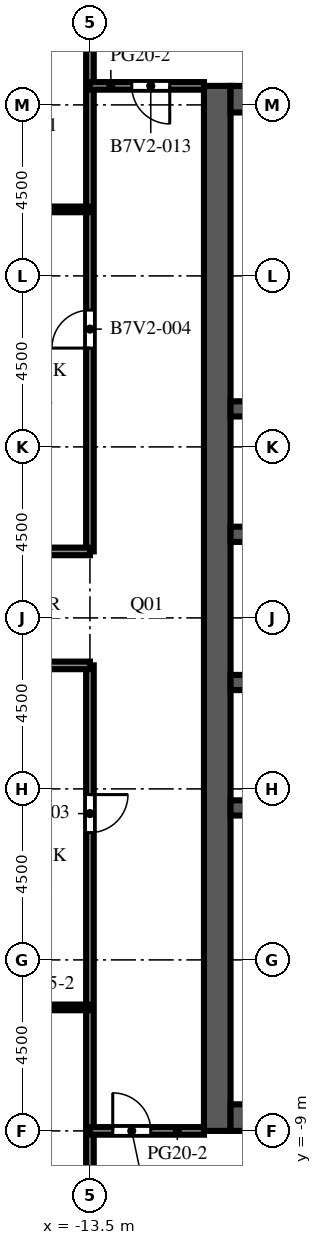
"""IFC4 building model, lengths in metres.
Left out: names, types, materials, properties, quantities, classifications, styles, units other than length and angle.
Written with IfcOpenShell. Run it as: python <this file> out.ifc"""

import sys

from ifc_helpers import new_model, si_unit, direction, frame, frame_2d, origin, place, context, subcontext, project, spatial, rectangle, extrude, element, fill, save


model = new_model("IFC4")
c1 = context("Model", 3, precision=1e-05, world=origin(), true_north=direction((0.0, 1.0)))
c2 = subcontext(c1, "Body", "Model", "MODEL_VIEW")
j1 = project(units=[si_unit("LENGTHUNIT", "METRE"), si_unit("PLANEANGLEUNIT", "RADIAN")], contexts=[c1])
p1 = place(None, origin())
s1 = spatial("IfcSite", under=j1, at=p1, CompositionType="ELEMENT")
p2 = place(p1, origin())
s2 = spatial("IfcBuilding", under=s1, at=p2, CompositionType="ELEMENT")
p3 = place(p2, frame((0.0, 0.0, 256.2)))
s3 = spatial("IfcBuildingStorey", under=s2, at=p3, CompositionType="ELEMENT", Elevation=256.2)
p4 = place(p3, frame((-10.15, -9.0, 0.0), z_axis=(0.0, 0.0, 1.0), x_axis=(0.0, 1.0, 0.0)))
e1 = element("IfcWall", 1, at=p4, inside=s3, PredefinedType="SHEAR", context=c2, shape_type="SweptSolid", body=[
    extrude(rectangle(XDim=27.5, YDim=0.7, at=frame_2d((13.75, 0.0))), origin(), (0.0, 0.0, 1.0), 4.1),
])
p5 = place(p4, frame((12.55, 0.0, 0.0)))
e2 = element("IfcOpeningElement", 2, at=p5, cuts=e1, PredefinedType="OPENING", context=c2, shape_type="SweptSolid", body=[
    extrude(rectangle(XDim=2.4, YDim=2.4, at=frame_2d((1.2, 1.2))), frame((0.0, 0.36, 0.0), z_axis=(0.0, -1.0, 0.0), x_axis=(1.0, 0.0, 0.0)), (0.0, 0.0, 1.0), 0.72),
])
p6 = place(p4, frame((6.825, 0.0, 0.0)))
e3 = element("IfcOpeningElement", 3, at=p6, cuts=e1, PredefinedType="OPENING", context=c2, shape_type="SweptSolid", body=[
    extrude(rectangle(XDim=1.2, YDim=2.1, at=frame_2d((0.6, 1.05))), frame((0.0, 0.36, 0.0), z_axis=(0.0, -1.0, 0.0), x_axis=(1.0, 0.0, 0.0)), (0.0, 0.0, 1.0), 0.72),
])
p7 = place(p4, frame((19.475, 0.0, 0.0)))
e4 = element("IfcOpeningElement", 4, at=p7, cuts=e1, PredefinedType="OPENING", context=c2, shape_type="SweptSolid", body=[
    extrude(rectangle(XDim=1.2, YDim=2.1, at=frame_2d((0.6, 1.05))), frame((0.0, 0.36, 0.0), z_axis=(0.0, -1.0, 0.0), x_axis=(1.0, 0.0, 0.0)), (0.0, 0.0, 1.0), 0.72),
])
for number, where, z_axis, x_axis in (
    (5, (-9.8, -8.65, 0.0), (0.0, 0.0, 1.0), (1.0, 0.0, 0.0)),
    (6, (-9.8, 18.15, 0.0), (0.0, 0.0, 1.0), (1.0, 0.0, 0.0)),
):
    element("IfcWall", number, at=place(p3, frame(where, z_axis=z_axis, x_axis=x_axis)), inside=s3, PredefinedType="SHEAR", context=c2, shape_type="SweptSolid", body=[
        extrude(rectangle(XDim=10.6, YDim=0.7, at=frame_2d((5.3, 0.0))), origin(), (0.0, 0.0, 1.0), 4.1),
    ])
p8 = place(p3, frame((-9.8, -0.5, 0.0), z_axis=(0.0, 0.0, 1.0), x_axis=(1.0, 0.0, 0.0)))
e7 = element("IfcWall", 7, at=p8, inside=s3, PredefinedType="SHEAR", context=c2, shape_type="SweptSolid", body=[
    extrude(rectangle(XDim=10.6, YDim=0.4, at=frame_2d((5.3, 0.0))), origin(), (0.0, 0.0, 1.0), 4.1),
])
p9 = place(p3, frame((-9.8, 2.8, 0.0), z_axis=(0.0, 0.0, 1.0), x_axis=(1.0, 0.0, 0.0)))
e8 = element("IfcWall", 8, at=p9, inside=s3, PredefinedType="SHEAR", context=c2, shape_type="SweptSolid", body=[
    extrude(rectangle(XDim=10.6, YDim=0.4, at=frame_2d((5.3, 0.0))), origin(), (0.0, 0.0, 1.0), 4.1),
])
p10 = place(p9, frame((0.688, 0.0, 0.0)))
e9 = element("IfcOpeningElement", 9, at=p10, cuts=e8, PredefinedType="OPENING", context=c2, shape_type="SweptSolid", body=[
    extrude(rectangle(XDim=1.1, YDim=2.1, at=frame_2d((0.55, 1.05))), frame((0.0, 0.21, 0.0), z_axis=(0.0, -1.0, 0.0), x_axis=(1.0, 0.0, 0.0)), (0.0, 0.0, 1.0), 0.42),
])
p11 = place(p9, frame((3.438, 0.0, 0.0)))
e10 = element("IfcOpeningElement", 10, at=p11, cuts=e8, PredefinedType="OPENING", context=c2, shape_type="SweptSolid", body=[
    extrude(rectangle(XDim=1.1, YDim=2.1, at=frame_2d((0.55, 1.05))), frame((0.0, 0.21, 0.0), z_axis=(0.0, -1.0, 0.0), x_axis=(1.0, 0.0, 0.0)), (0.0, 0.0, 1.0), 0.42),
])
p12 = place(p9, frame((6.113, 0.0, 0.0)))
e11 = element("IfcOpeningElement", 11, at=p12, cuts=e8, PredefinedType="OPENING", context=c2, shape_type="SweptSolid", body=[
    extrude(rectangle(XDim=1.0, YDim=2.1, at=frame_2d((0.5, 1.05))), frame((0.0, 0.21, 0.0), z_axis=(0.0, -1.0, 0.0), x_axis=(1.0, 0.0, 0.0)), (0.0, 0.0, 1.0), 0.42),
])
p13 = place(p9, frame((8.863, 0.0, 0.0)))
e12 = element("IfcOpeningElement", 12, at=p13, cuts=e8, PredefinedType="OPENING", context=c2, shape_type="SweptSolid", body=[
    extrude(rectangle(XDim=1.0, YDim=2.1, at=frame_2d((0.5, 1.05))), frame((0.0, 0.21, 0.0), z_axis=(0.0, -1.0, 0.0), x_axis=(1.0, 0.0, 0.0)), (0.0, 0.0, 1.0), 0.42),
])
p14 = place(p3, frame((-9.8, 6.7, 0.0), z_axis=(0.0, 0.0, 1.0), x_axis=(1.0, 0.0, 0.0)))
e13 = element("IfcWall", 13, at=p14, inside=s3, PredefinedType="SHEAR", context=c2, shape_type="SweptSolid", body=[
    extrude(rectangle(XDim=10.6, YDim=0.4, at=frame_2d((5.3, 0.0))), origin(), (0.0, 0.0, 1.0), 4.1),
])
p15 = place(p14, frame((3.438, 0.0, 0.0)))
e14 = element("IfcOpeningElement", 14, at=p15, cuts=e13, PredefinedType="OPENING", context=c2, shape_type="SweptSolid", body=[
    extrude(rectangle(XDim=1.1, YDim=2.1, at=frame_2d((0.55, 1.05))), frame((0.0, 0.21, 0.0), z_axis=(0.0, -1.0, 0.0), x_axis=(1.0, 0.0, 0.0)), (0.0, 0.0, 1.0), 0.42),
])
p16 = place(p14, frame((6.062, 0.0, 0.0)))
e15 = element("IfcOpeningElement", 15, at=p16, cuts=e13, PredefinedType="OPENING", context=c2, shape_type="SweptSolid", body=[
    extrude(rectangle(XDim=1.1, YDim=2.1, at=frame_2d((0.55, 1.05))), frame((0.0, 0.21, 0.0), z_axis=(0.0, -1.0, 0.0), x_axis=(1.0, 0.0, 0.0)), (0.0, 0.0, 1.0), 0.42),
])
p17 = place(p14, frame((8.812, 0.0, 0.0)))
e16 = element("IfcOpeningElement", 16, at=p17, cuts=e13, PredefinedType="OPENING", context=c2, shape_type="SweptSolid", body=[
    extrude(rectangle(XDim=1.1, YDim=2.1, at=frame_2d((0.55, 1.05))), frame((0.0, 0.21, 0.0), z_axis=(0.0, -1.0, 0.0), x_axis=(1.0, 0.0, 0.0)), (0.0, 0.0, 1.0), 0.42),
])
p18 = place(p14, frame((0.738, 0.0, 0.0)))
e17 = element("IfcOpeningElement", 17, at=p18, cuts=e13, PredefinedType="OPENING", context=c2, shape_type="SweptSolid", body=[
    extrude(rectangle(XDim=1.0, YDim=2.1, at=frame_2d((0.5, 1.05))), frame((0.0, 0.21, 0.0), z_axis=(0.0, -1.0, 0.0), x_axis=(1.0, 0.0, 0.0)), (0.0, 0.0, 1.0), 0.42),
])
p19 = place(p3, frame((-9.8, 10.0, 0.0), z_axis=(0.0, 0.0, 1.0), x_axis=(1.0, 0.0, 0.0)))
e18 = element("IfcWall", 18, at=p19, inside=s3, PredefinedType="SHEAR", context=c2, shape_type="SweptSolid", body=[
    extrude(rectangle(XDim=10.6, YDim=0.4, at=frame_2d((5.3, 0.0))), origin(), (0.0, 0.0, 1.0), 4.1),
])
p20 = place(p3, frame((-13.5, -22.077, 0.0), z_axis=(0.0, 0.0, 1.0), x_axis=(0.0, 1.0, 0.0)))
e19 = element("IfcWall", 19, at=p20, inside=s3, PredefinedType="PARTITIONING", context=c2, shape_type="SweptSolid", body=[
    extrude(rectangle(XDim=25.327, YDim=0.2, at=frame_2d((12.664, 0.0))), origin(), (0.0, 0.0, 1.0), 3.5),
])
p21 = place(p20, frame((20.927, 0.0, 0.0)))
e20 = element("IfcOpeningElement", 20, at=p21, cuts=e19, PredefinedType="OPENING", context=c2, shape_type="SweptSolid", body=[
    extrude(rectangle(XDim=1.0, YDim=2.1, at=frame_2d((0.5, 1.05))), frame((0.0, 0.11, 0.0), z_axis=(0.0, -1.0, 0.0), x_axis=(1.0, 0.0, 0.0)), (0.0, 0.0, 1.0), 0.22),
])
p22 = place(p3, frame((-13.5, 6.25, 0.0), z_axis=(0.0, 0.0, 1.0), x_axis=(0.0, 1.0, 0.0)))
e21 = element("IfcWall", 21, at=p22, inside=s3, PredefinedType="PARTITIONING", context=c2, shape_type="SweptSolid", body=[
    extrude(rectangle(XDim=24.827, YDim=0.2, at=frame_2d((12.414, 0.0))), origin(), (0.0, 0.0, 1.0), 3.5),
])
p23 = place(p22, frame((5.35, 0.0, 0.0)))
e22 = element("IfcOpeningElement", 22, at=p23, cuts=e21, PredefinedType="OPENING", context=c2, shape_type="SweptSolid", body=[
    extrude(rectangle(XDim=1.0, YDim=2.1, at=frame_2d((0.5, 1.05))), frame((0.0, 0.11, 0.0), z_axis=(0.0, -1.0, 0.0), x_axis=(1.0, 0.0, 0.0)), (0.0, 0.0, 1.0), 0.22),
])
p24 = place(p3, frame((-10.5, -9.0, 0.0), z_axis=(0.0, 0.0, 1.0), x_axis=(-1.0, 0.0, 0.0)))
e23 = element("IfcWall", 23, at=p24, inside=s3, PredefinedType="PARTITIONING", context=c2, shape_type="SweptSolid", body=[
    extrude(rectangle(XDim=3.0, YDim=0.2, at=frame_2d((1.5, 0.0))), origin(), (0.0, 0.0, 1.0), 3.5),
])
p25 = place(p24, frame((1.4, 0.0, 0.0)))
e24 = element("IfcOpeningElement", 24, at=p25, cuts=e23, PredefinedType="OPENING", context=c2, shape_type="SweptSolid", body=[
    extrude(rectangle(XDim=1.0, YDim=2.1, at=frame_2d((0.5, 1.05))), frame((0.0, 0.11, 0.0), z_axis=(0.0, -1.0, 0.0), x_axis=(1.0, 0.0, 0.0)), (0.0, 0.0, 1.0), 0.22),
])
p26 = place(p3, frame((-13.5, -5.75, 0.0), z_axis=(0.0, 0.0, 1.0), x_axis=(-1.0, 0.0, 0.0)))
e25 = element("IfcWall", 25, at=p26, inside=s3, PredefinedType="PARTITIONING", context=c2, shape_type="SweptSolid", body=[
    extrude(rectangle(XDim=4.35, YDim=0.15, at=frame_2d((2.175, 0.0))), origin(), (0.0, 0.0, 1.0), 3.5),
])
p27 = place(p26, frame((2.4, 0.0, 0.0)))
e26 = element("IfcOpeningElement", 26, at=p27, cuts=e25, PredefinedType="OPENING", context=c2, shape_type="SweptSolid", body=[
    extrude(rectangle(XDim=1.0, YDim=2.1, at=frame_2d((0.5, 1.05))), frame((0.0, 0.085, 0.0), z_axis=(0.0, -1.0, 0.0), x_axis=(1.0, 0.0, 0.0)), (0.0, 0.0, 1.0), 0.17),
])
for number, where, z_axis, x_axis in (
    (27, (-17.85, 3.25, 0.0), (0.0, 0.0, 1.0), (1.0, 0.0, 0.0)),
    (28, (-17.85, 6.25, 0.0), (0.0, 0.0, 1.0), (1.0, 0.0, 0.0)),
):
    element("IfcWall", number, at=place(p3, frame(where, z_axis=z_axis, x_axis=x_axis)), inside=s3, PredefinedType="PARTITIONING", context=c2, shape_type="SweptSolid", body=[
        extrude(rectangle(XDim=4.35, YDim=0.2, at=frame_2d((2.175, 0.0))), origin(), (0.0, 0.0, 1.0), 3.5),
    ])
p28 = place(p3, frame((-17.85, 15.25, 0.0), z_axis=(0.0, 0.0, 1.0), x_axis=(1.0, 0.0, 0.0)))
e29 = element("IfcWall", 29, at=p28, inside=s3, PredefinedType="PARTITIONING", context=c2, shape_type="SweptSolid", body=[
    extrude(rectangle(XDim=4.35, YDim=0.15, at=frame_2d((2.175, 0.0))), origin(), (0.0, 0.0, 1.0), 3.5),
])
p29 = place(p28, frame((1.95, 0.0, 0.0)))
e30 = element("IfcOpeningElement", 30, at=p29, cuts=e29, PredefinedType="OPENING", context=c2, shape_type="SweptSolid", body=[
    extrude(rectangle(XDim=1.0, YDim=2.1, at=frame_2d((0.5, 1.05))), frame((0.0, 0.085, 0.0), z_axis=(0.0, -1.0, 0.0), x_axis=(1.0, 0.0, 0.0)), (0.0, 0.0, 1.0), 0.17),
])
p30 = place(p3, frame((-13.5, 18.5, 0.0), z_axis=(0.0, 0.0, 1.0), x_axis=(1.0, 0.0, 0.0)))
e31 = element("IfcWall", 31, at=p30, inside=s3, PredefinedType="PARTITIONING", context=c2, shape_type="SweptSolid", body=[
    extrude(rectangle(XDim=3.0, YDim=0.2, at=frame_2d((1.5, 0.0))), origin(), (0.0, 0.0, 1.0), 3.5),
])
p31 = place(p30, frame((1.1, 0.0, 0.0)))
e32 = element("IfcOpeningElement", 32, at=p31, cuts=e31, PredefinedType="OPENING", context=c2, shape_type="SweptSolid", body=[
    extrude(rectangle(XDim=1.0, YDim=2.1, at=frame_2d((0.5, 1.05))), frame((0.0, 0.11, 0.0), z_axis=(0.0, -1.0, 0.0), x_axis=(1.0, 0.0, 0.0)), (0.0, 0.0, 1.0), 0.22),
])
p32 = place(p5, origin())
e33 = element("IfcDoor", 33, at=p32, inside=s3, OperationType="DOUBLE_DOOR_DOUBLE_SWING", PredefinedType="DOOR", context=c2, shape_type="SweptSolid", body=[
    extrude(rectangle(XDim=2.4, YDim=2.4, at=frame_2d((1.2, 1.2))), frame((0.0, 0.025, 0.0), z_axis=(0.0, -1.0, 0.0), x_axis=(1.0, 0.0, 0.0)), (0.0, 0.0, 1.0), 0.05),
])
fill(e2, e33)
p33 = place(p6, origin())
e34 = element("IfcDoor", 34, at=p33, inside=s3, OperationType="SINGLE_SWING_LEFT", PredefinedType="DOOR", context=c2, shape_type="SweptSolid", body=[
    extrude(rectangle(XDim=1.2, YDim=2.1, at=frame_2d((0.6, 1.05))), frame((0.0, 0.025, 0.0), z_axis=(0.0, -1.0, 0.0), x_axis=(1.0, 0.0, 0.0)), (0.0, 0.0, 1.0), 0.05),
])
fill(e3, e34)
p34 = place(p7, origin())
e35 = element("IfcDoor", 35, at=p34, inside=s3, OperationType="SINGLE_SWING_LEFT", PredefinedType="DOOR", context=c2, shape_type="SweptSolid", body=[
    extrude(rectangle(XDim=1.2, YDim=2.1, at=frame_2d((0.6, 1.05))), frame((0.0, 0.025, 0.0), z_axis=(0.0, -1.0, 0.0), x_axis=(1.0, 0.0, 0.0)), (0.0, 0.0, 1.0), 0.05),
])
fill(e4, e35)
p35 = place(p21, origin())
e36 = element("IfcDoor", 36, at=p35, inside=s3, OperationType="SINGLE_SWING_RIGHT", PredefinedType="DOOR", context=c2, shape_type="SweptSolid", body=[
    extrude(rectangle(XDim=1.0, YDim=2.1, at=frame_2d((0.5, 1.05))), frame((0.0, 0.025, 0.0), z_axis=(0.0, -1.0, 0.0), x_axis=(1.0, 0.0, 0.0)), (0.0, 0.0, 1.0), 0.05),
])
fill(e20, e36)
p36 = place(p23, origin())
e37 = element("IfcDoor", 37, at=p36, inside=s3, OperationType="SINGLE_SWING_LEFT", PredefinedType="DOOR", context=c2, shape_type="SweptSolid", body=[
    extrude(rectangle(XDim=1.0, YDim=2.1, at=frame_2d((0.5, 1.05))), frame((0.0, 0.025, 0.0), z_axis=(0.0, -1.0, 0.0), x_axis=(1.0, 0.0, 0.0)), (0.0, 0.0, 1.0), 0.05),
])
fill(e22, e37)
p37 = place(p25, origin())
e38 = element("IfcDoor", 38, at=p37, inside=s3, OperationType="SINGLE_SWING_RIGHT", PredefinedType="DOOR", context=c2, shape_type="SweptSolid", body=[
    extrude(rectangle(XDim=1.0, YDim=2.1, at=frame_2d((0.5, 1.05))), frame((0.0, 0.025, 0.0), z_axis=(0.0, -1.0, 0.0), x_axis=(1.0, 0.0, 0.0)), (0.0, 0.0, 1.0), 0.05),
])
fill(e24, e38)
p38 = place(p31, origin())
e39 = element("IfcDoor", 39, at=p38, inside=s3, OperationType="SINGLE_SWING_RIGHT", PredefinedType="DOOR", context=c2, shape_type="SweptSolid", body=[
    extrude(rectangle(XDim=1.0, YDim=2.1, at=frame_2d((0.5, 1.05))), frame((0.0, 0.025, 0.0), z_axis=(0.0, -1.0, 0.0), x_axis=(1.0, 0.0, 0.0)), (0.0, 0.0, 1.0), 0.05),
])
fill(e32, e39)
save(model, sys.argv[1])
